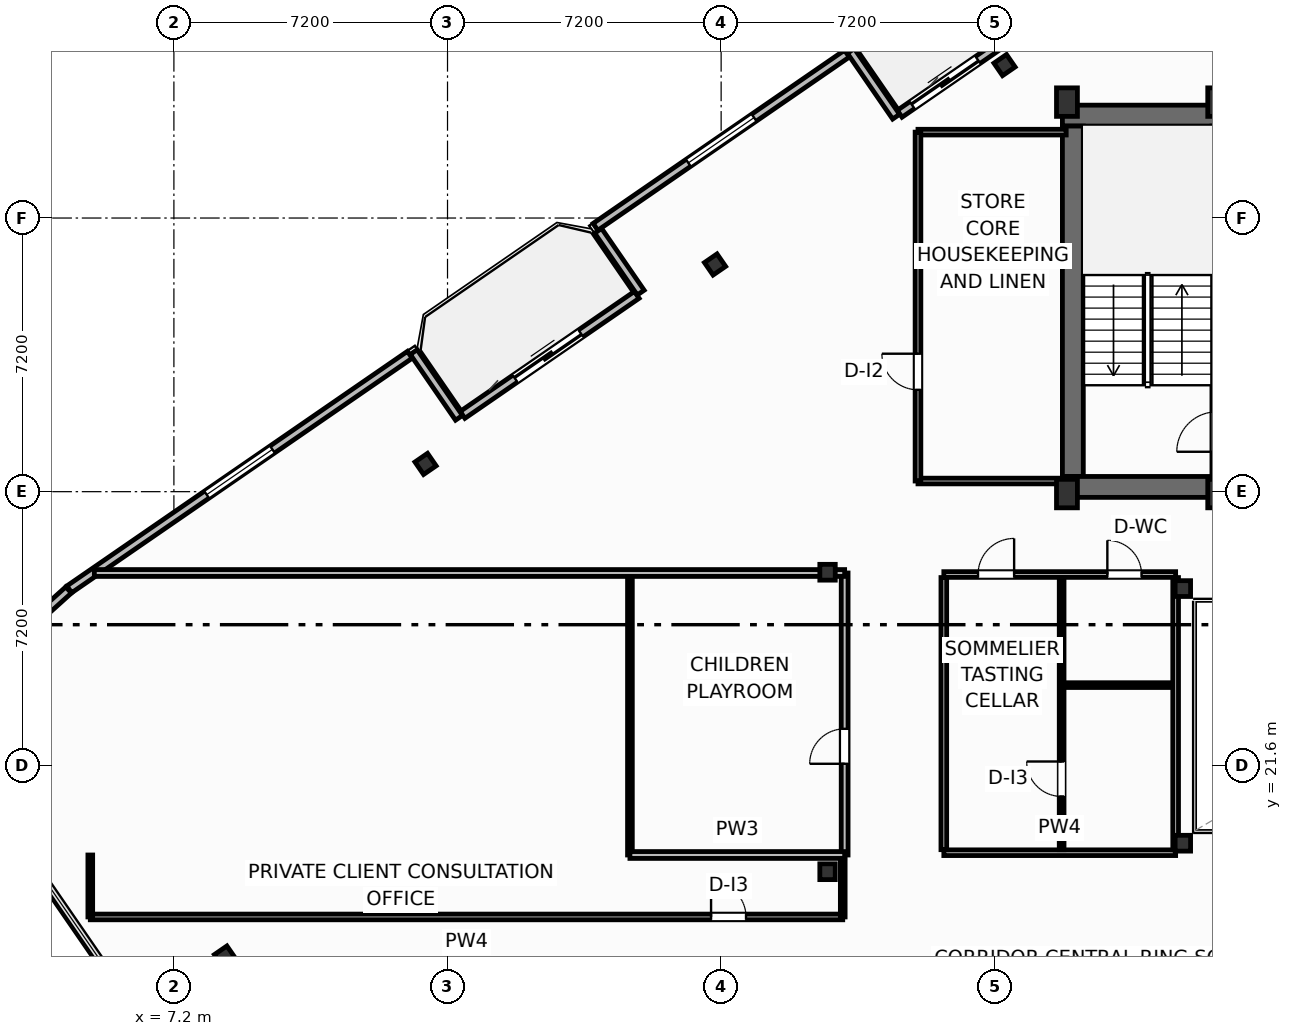
"""IFC4 building model, lengths in metres.
Left out: names, types, materials, properties, quantities, classifications, styles, units other than length and angle.
Written with IfcOpenShell. Run it as: python <this file> out.ifc"""

import sys

from ifc_helpers import new_model, si_unit, direction, frame, frame_2d, origin, origin_2d, place, context, subcontext, project, spatial, rectangle, i_section, extrude, element, fill, save


model = new_model("IFC4")
c1 = context("Model", 3, precision=1e-05, world=origin(), true_north=direction((0.0, 1.0)))
c2 = subcontext(c1, "Body", "Model", "MODEL_VIEW")
j1 = project(units=[si_unit("LENGTHUNIT", "METRE"), si_unit("PLANEANGLEUNIT", "RADIAN")], contexts=[c1])
p1 = place(None, origin())
s1 = spatial("IfcSite", under=j1, at=p1, CompositionType="ELEMENT")
p2 = place(p1, origin())
s2 = spatial("IfcBuilding", under=s1, at=p2, CompositionType="ELEMENT")
p3 = place(p2, frame((0.0, 0.0, 265.6)))
s3 = spatial("IfcBuildingStorey", under=s2, at=p3, CompositionType="ELEMENT", Elevation=265.6)
for number, where, z_axis, x_axis in (
    (1, (30.7, 28.75, 0.0), (0.0, 0.0, 1.0), (1.0, 0.0, 0.0)),
    (2, (34.68, 28.75, 0.0), (0.0, 0.0, 1.0), (1.0, 0.0, 0.0)),
    (3, (30.7, 39.05, 0.0), (0.0, 0.0, 1.0), (1.0, 0.0, 0.0)),
    (4, (34.68, 39.05, 0.0), (0.0, 0.0, 1.0), (1.0, 0.0, 0.0)),
):
    element("IfcColumn", number, at=place(p3, frame(where, z_axis=z_axis, x_axis=x_axis)), inside=s3, PredefinedType="COLUMN", context=c2, shape_type="SweptSolid", body=[
        extrude(rectangle(XDim=0.55, YDim=0.75, at=origin_2d()), origin(), (0.0, 0.0, 1.0), 3.7),
    ])
for number, where, z_axis, x_axis in (
    (5, (33.75, 19.55, 0.0), (0.0, 0.0, 1.0), (1.0, 0.0, 0.0)),
    (6, (33.75, 26.25, 0.0), (0.0, 0.0, 1.0), (1.0, 0.0, 0.0)),
    (7, (24.4, 18.8, 0.0), (0.0, 0.0, 1.0), (1.0, 0.0, 0.0)),
    (8, (24.4, 26.68, 0.0), (0.0, 0.0, 1.0), (1.0, 0.0, 0.0)),
):
    element("IfcColumn", number, at=place(p3, frame(where, z_axis=z_axis, x_axis=x_axis)), inside=s3, PredefinedType="COLUMN", context=c2, shape_type="SweptSolid", body=[
        extrude(i_section(OverallWidth=0.406, OverallDepth=0.416, WebThickness=0.03, FlangeThickness=0.048, FilletRadius=0.025, at=origin_2d()), origin(), (0.0, 0.0, 1.0), 3.7),
    ])
p4 = place(p3, frame((30.58, 38.695, 0.0), z_axis=(0.0, 0.0, 1.0), x_axis=(1.0, 0.0, 0.0)))
e9 = element("IfcWall", 9, at=p4, inside=s3, PredefinedType="SHEAR", context=c2, shape_type="SweptSolid", body=[
    extrude(rectangle(XDim=17.24, YDim=0.55, at=frame_2d((8.62, 0.0))), origin(), (0.0, 0.0, 1.0), 3.45),
])
p5 = place(p3, frame((30.855, 29.2, 0.0), z_axis=(0.0, 0.0, 1.0), x_axis=(0.0, 1.0, 0.0)))
e10 = element("IfcWall", 10, at=p5, inside=s3, PredefinedType="SHEAR", context=c2, shape_type="SweptSolid", body=[
    extrude(rectangle(XDim=9.22, YDim=0.55, at=frame_2d((4.61, 0.0))), origin(), (0.0, 0.0, 1.0), 3.45),
])
p6 = place(p3, frame((30.58, 28.925, 0.0), z_axis=(0.0, 0.0, 1.0), x_axis=(1.0, 0.0, 0.0)))
e11 = element("IfcWall", 11, at=p6, inside=s3, PredefinedType="SHEAR", context=c2, shape_type="SweptSolid", body=[
    extrude(rectangle(XDim=4.22, YDim=0.55, at=frame_2d((2.11, 0.0))), origin(), (0.0, 0.0, 1.0), 3.45),
])
p7 = place(p3, frame((34.64, 29.2, 0.0), z_axis=(0.0, 0.0, 1.0), x_axis=(0.0, 1.0, 0.0)))
e12 = element("IfcWall", 12, at=p7, inside=s3, PredefinedType="SHEAR", context=c2, shape_type="SweptSolid", body=[
    extrude(rectangle(XDim=9.22, YDim=0.25, at=frame_2d((4.61, 0.0))), origin(), (0.0, 0.0, 1.0), 3.45),
])
p8 = place(p7, frame((0.65, 0.0, 0.0)))
e13 = element("IfcOpeningElement", 13, at=p8, cuts=e12, PredefinedType="OPENING", context=c2, shape_type="SweptSolid", body=[
    extrude(rectangle(XDim=1.05, YDim=2.15, at=frame_2d((0.525, 1.075))), frame((0.0, 0.135, 0.0), z_axis=(0.0, -1.0, 0.0), x_axis=(1.0, 0.0, 0.0)), (0.0, 0.0, 1.0), 0.27),
])
for number, where, z_axis, x_axis in (
    (14, (29.057, 40.025, 0.0), (0.0, 0.0, 1.0), (0.824, 0.567, 0.0)),
    (15, (21.44, 34.778, 0.0), (0.0, 0.0, 1.0), (0.824, 0.567, 0.0)),
    (16, (13.822, 29.53, 0.0), (0.0, 0.0, 1.0), (0.824, 0.567, 0.0)),
    (17, (8.543, 16.569, 0.0), (0.0, 0.0, 1.0), (0.824, 0.567, 0.0)),
):
    element("IfcColumn", number, at=place(p3, frame(where, z_axis=z_axis, x_axis=x_axis)), inside=s3, PredefinedType="COLUMN", context=c2, shape_type="SweptSolid", body=[
        extrude(i_section(OverallWidth=0.401, OverallDepth=0.399, WebThickness=0.025, FlangeThickness=0.04, FilletRadius=0.022, at=origin_2d()), origin(), (0.0, 0.0, 1.0), 3.7),
    ])
p9 = place(p3, frame((14.795, 30.82, 0.0), z_axis=(0.0, 0.0, 1.0), x_axis=(0.823541290762, 0.567256328665, 0.0)))
e18 = element("IfcWall", 18, at=p9, inside=s3, PredefinedType="SOLIDWALL", context=c2, shape_type="SweptSolid", body=[
    extrude(rectangle(XDim=5.567, YDim=0.22, at=frame_2d((2.784, 0.0))), origin(), (0.0, 0.0, 1.0), 2.73),
])
p10 = place(p9, frame((1.68, 0.0, 0.0)))
e19 = element("IfcOpeningElement", 19, at=p10, cuts=e18, PredefinedType="OPENING", context=c2, shape_type="SweptSolid", body=[
    extrude(rectangle(XDim=2.1, YDim=2.3, at=frame_2d((1.05, 1.15))), frame((0.0, 0.12, 0.0), z_axis=(0.0, -1.0, 0.0), x_axis=(1.0, 0.0, 0.0)), (0.0, 0.0, 1.0), 0.24),
])
p11 = place(p3, frame((26.297, 38.743, 0.0), z_axis=(0.0, 0.0, 1.0), x_axis=(0.823534636215, 0.567265989598, 0.0)))
e20 = element("IfcWall", 20, at=p11, inside=s3, PredefinedType="SOLIDWALL", context=c2, shape_type="SweptSolid", body=[
    extrude(rectangle(XDim=6.0, YDim=0.22, at=frame_2d((3.0, 0.0))), origin(), (0.0, 0.0, 1.0), 2.73),
])
p12 = place(p11, frame((0.4, 0.0, 0.0)))
e21 = element("IfcOpeningElement", 21, at=p12, cuts=e20, PredefinedType="OPENING", context=c2, shape_type="SweptSolid", body=[
    extrude(rectangle(XDim=2.1, YDim=2.3, at=frame_2d((1.05, 1.15))), frame((0.0, 0.12, 0.0), z_axis=(0.0, -1.0, 0.0), x_axis=(1.0, 0.0, 0.0)), (0.0, 0.0, 1.0), 0.24),
])
p13 = place(p3, frame((26.204, 38.667, 0.0), z_axis=(0.0, 0.0, 1.0), x_axis=(-0.567219383419, 0.823566737474, 0.0)))
e22 = element("IfcWall", 22, at=p13, inside=s3, PredefinedType="SOLIDWALL", context=c2, shape_type="SweptSolid", body=[
    extrude(rectangle(XDim=2.1, YDim=0.22, at=frame_2d((1.05, 0.0))), origin(), (0.0, 0.0, 1.0), 2.73),
])
p14 = place(p3, frame((24.91, 40.325, 0.0), z_axis=(0.0, 0.0, 1.0), x_axis=(-0.823521165086, -0.56728554596, 0.0)))
e23 = element("IfcWall", 23, at=p14, inside=s3, PredefinedType="SOLIDWALL", context=c2, shape_type="SweptSolid", body=[
    extrude(rectangle(XDim=8.035, YDim=0.22, at=frame_2d((4.018, 0.0))), origin(), (0.0, 0.0, 1.0), 2.73),
])
p15 = place(p14, frame((2.968, 0.0, 0.8)))
e24 = element("IfcOpeningElement", 24, at=p15, cuts=e23, PredefinedType="OPENING", context=c2, shape_type="SweptSolid", body=[
    extrude(rectangle(XDim=2.1, YDim=1.75, at=frame_2d((1.05, 0.875))), frame((0.0, 0.12, 0.0), z_axis=(0.0, -1.0, 0.0), x_axis=(1.0, 0.0, 0.0)), (0.0, 0.0, 1.0), 0.24),
])
p16 = place(p3, frame((18.364, 35.664, 0.0), z_axis=(0.0, 0.0, 1.0), x_axis=(0.567215821234, -0.823569190865, 0.0)))
e25 = element("IfcWall", 25, at=p16, inside=s3, PredefinedType="SOLIDWALL", context=c2, shape_type="SweptSolid", body=[
    extrude(rectangle(XDim=1.975, YDim=0.22, at=frame_2d((0.988, 0.0))), origin(), (0.0, 0.0, 1.0), 2.73),
])
p17 = place(p3, frame((14.702, 30.744, 0.0), z_axis=(0.0, 0.0, 1.0), x_axis=(-0.567352541689, 0.823475010816, 0.0)))
e26 = element("IfcWall", 26, at=p17, inside=s3, PredefinedType="SOLIDWALL", context=c2, shape_type="SweptSolid", body=[
    extrude(rectangle(XDim=2.1, YDim=0.22, at=frame_2d((1.05, 0.0))), origin(), (0.0, 0.0, 1.0), 2.73),
])
p18 = place(p3, frame((13.408, 32.402, 0.0), z_axis=(0.0, 0.0, 1.0), x_axis=(-0.823527634633, -0.567276154087, 0.0)))
e27 = element("IfcWall", 27, at=p18, inside=s3, PredefinedType="SOLIDWALL", context=c2, shape_type="SweptSolid", body=[
    extrude(rectangle(XDim=10.88, YDim=0.22, at=frame_2d((5.44, 0.0))), origin(), (0.0, 0.0, 1.0), 2.73),
])
p19 = place(p18, frame((4.39, 0.0, 0.8)))
e28 = element("IfcOpeningElement", 28, at=p19, cuts=e27, PredefinedType="OPENING", context=c2, shape_type="SweptSolid", body=[
    extrude(rectangle(XDim=2.1, YDim=1.75, at=frame_2d((1.05, 0.875))), frame((0.0, 0.12, 0.0), z_axis=(0.0, -1.0, 0.0), x_axis=(1.0, 0.0, 0.0)), (0.0, 0.0, 1.0), 0.24),
])
p20 = place(p3, frame((4.429, 26.213, 0.0), z_axis=(0.0, 0.0, 1.0), x_axis=(-0.742414330744, -0.669941013453, 0.0)))
e29 = element("IfcWall", 29, at=p20, inside=s3, PredefinedType="SOLIDWALL", context=c2, shape_type="SweptSolid", body=[
    extrude(rectangle(XDim=1.257, YDim=0.22, at=frame_2d((0.628, 0.0))), origin(), (0.0, 0.0, 1.0), 2.73),
])
p21 = place(p3, frame((5.0, 17.61, 0.0), z_axis=(0.0, 0.0, 1.0), x_axis=(1.0, 0.0, 0.0)))
e30 = element("IfcWall", 30, at=p21, inside=s3, PredefinedType="PARTITIONING", context=c2, shape_type="SweptSolid", body=[
    extrude(rectangle(XDim=19.8, YDim=0.15, at=frame_2d((9.9, 0.0))), origin(), (0.0, 0.0, 1.0), 2.739),
])
p22 = place(p21, frame((16.335, 0.0, 0.0)))
e31 = element("IfcOpeningElement", 31, at=p22, cuts=e30, PredefinedType="OPENING", context=c2, shape_type="SweptSolid", body=[
    extrude(rectangle(XDim=0.92, YDim=2.05, at=frame_2d((0.46, 1.025))), frame((0.0, 0.085, 0.0), z_axis=(0.0, -1.0, 0.0), x_axis=(1.0, 0.0, 0.0)), (0.0, 0.0, 1.0), 0.17),
])
for number, where, z_axis, x_axis in (
    (32, (5.0, 17.61, 0.0), (0.0, 0.0, 1.0), (0.0, 1.0, 0.0)),
    (33, (24.8, 17.61, 0.0), (0.0, 0.0, 1.0), (0.0, 1.0, 0.0)),
):
    element("IfcWall", number, at=place(p3, frame(where, z_axis=z_axis, x_axis=x_axis)), inside=s3, PredefinedType="PARTITIONING", context=c2, shape_type="SweptSolid", body=[
        extrude(rectangle(XDim=1.63, YDim=0.125, at=frame_2d((0.815, 0.0))), origin(), (0.0, 0.0, 1.0), 3.45),
    ])
p23 = place(p3, frame((24.85, 19.24, 0.0), z_axis=(0.0, 0.0, 1.0), x_axis=(0.0, 1.0, 0.0)))
e34 = element("IfcWall", 34, at=p23, inside=s3, PredefinedType="PARTITIONING", context=c2, shape_type="SweptSolid", body=[
    extrude(rectangle(XDim=7.42, YDim=0.18, at=frame_2d((3.71, 0.0))), origin(), (0.0, 0.0, 1.0), 3.45),
])
p24 = place(p23, frame((2.4, 0.0, 0.0)))
e35 = element("IfcOpeningElement", 35, at=p24, cuts=e34, PredefinedType="OPENING", context=c2, shape_type="SweptSolid", body=[
    extrude(rectangle(XDim=0.92, YDim=2.05, at=frame_2d((0.46, 1.025))), frame((0.0, 0.1, 0.0), z_axis=(0.0, -1.0, 0.0), x_axis=(1.0, 0.0, 0.0)), (0.0, 0.0, 1.0), 0.2),
])
p25 = place(p3, frame((19.2, 19.24, 0.0), z_axis=(0.0, 0.0, 1.0), x_axis=(0.0, 1.0, 0.0)))
e36 = element("IfcWall", 36, at=p25, inside=s3, PredefinedType="PARTITIONING", context=c2, shape_type="SweptSolid", body=[
    extrude(rectangle(XDim=7.42, YDim=0.125, at=frame_2d((3.71, 0.0))), origin(), (0.0, 0.0, 1.0), 3.45),
])
p26 = place(p3, frame((19.2, 19.24, 0.0), z_axis=(0.0, 0.0, 1.0), x_axis=(1.0, 0.0, 0.0)))
e37 = element("IfcWall", 37, at=p26, inside=s3, PredefinedType="PARTITIONING", context=c2, shape_type="SweptSolid", body=[
    extrude(rectangle(XDim=5.65, YDim=0.18, at=frame_2d((2.825, 0.0))), origin(), (0.0, 0.0, 1.0), 3.45),
])
p27 = place(p3, frame((5.107, 26.66, 0.0), z_axis=(0.0, 0.0, 1.0), x_axis=(1.0, 0.0, 0.0)))
e38 = element("IfcWall", 38, at=p27, inside=s3, PredefinedType="PARTITIONING", context=c2, shape_type="SweptSolid", body=[
    extrude(rectangle(XDim=19.743, YDim=0.18, at=frame_2d((9.872, 0.0))), origin(), (0.0, 0.0, 1.0), 2.662),
])
p28 = place(p3, frame((27.46, 26.62, 0.0), z_axis=(0.0, 0.0, 1.0), x_axis=(1.0, 0.0, 0.0)))
e39 = element("IfcWall", 39, at=p28, inside=s3, PredefinedType="PARTITIONING", context=c2, shape_type="SweptSolid", body=[
    extrude(rectangle(XDim=6.1, YDim=0.15, at=frame_2d((3.05, 0.0))), origin(), (0.0, 0.0, 1.0), 2.662),
])
p29 = place(p28, frame((0.9, 0.0, 0.0)))
e40 = element("IfcOpeningElement", 40, at=p29, cuts=e39, PredefinedType="OPENING", context=c2, shape_type="SweptSolid", body=[
    extrude(rectangle(XDim=0.95, YDim=2.05, at=frame_2d((0.475, 1.025))), frame((0.0, 0.085, 0.0), z_axis=(0.0, -1.0, 0.0), x_axis=(1.0, 0.0, 0.0)), (0.0, 0.0, 1.0), 0.17),
])
p30 = place(p28, frame((4.303, 0.0, 0.0)))
e41 = element("IfcOpeningElement", 41, at=p30, cuts=e39, PredefinedType="OPENING", context=c2, shape_type="SweptSolid", body=[
    extrude(rectangle(XDim=0.9, YDim=2.05, at=frame_2d((0.45, 1.025))), frame((0.0, 0.085, 0.0), z_axis=(0.0, -1.0, 0.0), x_axis=(1.0, 0.0, 0.0)), (0.0, 0.0, 1.0), 0.17),
])
p31 = place(p3, frame((27.46, 19.3, 0.0), z_axis=(0.0, 0.0, 1.0), x_axis=(1.0, 0.0, 0.0)))
e42 = element("IfcWall", 42, at=p31, inside=s3, PredefinedType="PARTITIONING", context=c2, shape_type="SweptSolid", body=[
    extrude(rectangle(XDim=6.1, YDim=0.15, at=frame_2d((3.05, 0.0))), origin(), (0.0, 0.0, 1.0), 2.662),
])
p32 = place(p3, frame((30.56, 19.38, 0.0), z_axis=(0.0, 0.0, 1.0), x_axis=(0.0, 1.0, 0.0)))
e43 = element("IfcWall", 43, at=p32, inside=s3, PredefinedType="PARTITIONING", context=c2, shape_type="SweptSolid", body=[
    extrude(rectangle(XDim=7.16, YDim=0.125, at=frame_2d((3.58, 0.0))), origin(), (0.0, 0.0, 1.0), 3.45),
])
p33 = place(p32, frame((1.4, 0.0, 0.0)))
e44 = element("IfcOpeningElement", 44, at=p33, cuts=e43, PredefinedType="OPENING", context=c2, shape_type="SweptSolid", body=[
    extrude(rectangle(XDim=0.92, YDim=2.05, at=frame_2d((0.46, 1.025))), frame((0.0, 0.073, 0.0), z_axis=(0.0, -1.0, 0.0), x_axis=(1.0, 0.0, 0.0)), (0.0, 0.0, 1.0), 0.145),
])
p34 = place(p3, frame((30.64, 23.71, 0.0), z_axis=(0.0, 0.0, 1.0), x_axis=(1.0, 0.0, 0.0)))
e45 = element("IfcWall", 45, at=p34, inside=s3, PredefinedType="PARTITIONING", context=c2, shape_type="SweptSolid", body=[
    extrude(rectangle(XDim=2.88, YDim=0.125, at=frame_2d((1.44, 0.0))), origin(), (0.0, 0.0, 1.0), 3.45),
])
p35 = place(p3, frame((27.46, 19.38, 0.0), z_axis=(0.0, 0.0, 1.0), x_axis=(0.0, 1.0, 0.0)))
e46 = element("IfcWall", 46, at=p35, inside=s3, PredefinedType="PARTITIONING", context=c2, shape_type="SweptSolid", body=[
    extrude(rectangle(XDim=7.16, YDim=0.15, at=frame_2d((3.58, 0.0))), origin(), (0.0, 0.0, 1.0), 3.45),
])
p36 = place(p3, frame((33.56, 19.38, 0.0), z_axis=(0.0, 0.0, 1.0), x_axis=(0.0, 1.0, 0.0)))
e47 = element("IfcWall", 47, at=p36, inside=s3, PredefinedType="PARTITIONING", context=c2, shape_type="SweptSolid", body=[
    extrude(rectangle(XDim=7.16, YDim=0.15, at=frame_2d((3.58, 0.0))), origin(), (0.0, 0.0, 1.0), 2.824),
])
p37 = place(p3, frame((26.78, 29.08, 0.0), z_axis=(0.0, 0.0, 1.0), x_axis=(1.0, 0.0, 0.0)))
e48 = element("IfcWall", 48, at=p37, inside=s3, PredefinedType="PARTITIONING", context=c2, shape_type="SweptSolid", body=[
    extrude(rectangle(XDim=3.8, YDim=0.15, at=frame_2d((1.9, 0.0))), origin(), (0.0, 0.0, 1.0), 3.45),
])
p38 = place(p3, frame((26.78, 38.26, 0.0), z_axis=(0.0, 0.0, 1.0), x_axis=(1.0, 0.0, 0.0)))
e49 = element("IfcWall", 49, at=p38, inside=s3, PredefinedType="PARTITIONING", context=c2, shape_type="SweptSolid", body=[
    extrude(rectangle(XDim=3.9, YDim=0.15, at=frame_2d((1.95, 0.0))), origin(), (0.0, 0.0, 1.0), 3.45),
])
p39 = place(p3, frame((26.78, 29.08, 0.0), z_axis=(0.0, 0.0, 1.0), x_axis=(0.0, 1.0, 0.0)))
e50 = element("IfcWall", 50, at=p39, inside=s3, PredefinedType="PARTITIONING", context=c2, shape_type="SweptSolid", body=[
    extrude(rectangle(XDim=9.18, YDim=0.15, at=frame_2d((4.59, 0.0))), origin(), (0.0, 0.0, 1.0), 3.45),
])
p40 = place(p39, frame((2.4, 0.0, 0.0)))
e51 = element("IfcOpeningElement", 51, at=p40, cuts=e50, PredefinedType="OPENING", context=c2, shape_type="SweptSolid", body=[
    extrude(rectangle(XDim=0.95, YDim=2.05, at=frame_2d((0.475, 1.025))), frame((0.0, 0.085, 0.0), z_axis=(0.0, -1.0, 0.0), x_axis=(1.0, 0.0, 0.0)), (0.0, 0.0, 1.0), 0.17),
])
p41 = place(p10, origin())
e52 = element("IfcDoor", 52, at=p41, inside=s3, OperationType="SLIDING_TO_LEFT", PredefinedType="DOOR", context=c2, shape_type="SweptSolid", body=[
    extrude(rectangle(XDim=2.1, YDim=2.3, at=frame_2d((1.05, 1.15))), frame((0.0, 0.025, 0.0), z_axis=(0.0, -1.0, 0.0), x_axis=(1.0, 0.0, 0.0)), (0.0, 0.0, 1.0), 0.05),
])
fill(e19, e52)
p42 = place(p12, origin())
e53 = element("IfcDoor", 53, at=p42, inside=s3, OperationType="SLIDING_TO_LEFT", PredefinedType="DOOR", context=c2, shape_type="SweptSolid", body=[
    extrude(rectangle(XDim=2.1, YDim=2.3, at=frame_2d((1.05, 1.15))), frame((0.0, 0.025, 0.0), z_axis=(0.0, -1.0, 0.0), x_axis=(1.0, 0.0, 0.0)), (0.0, 0.0, 1.0), 0.05),
])
fill(e21, e53)
p43 = place(p15, origin())
e54 = element("IfcWindow", 54, at=p43, inside=s3, PartitioningType="SINGLE_PANEL", PredefinedType="WINDOW", context=c2, shape_type="SweptSolid", body=[
    extrude(rectangle(XDim=2.1, YDim=1.75, at=frame_2d((1.05, 0.875))), frame((0.0, 0.03, 0.0), z_axis=(0.0, -1.0, 0.0), x_axis=(1.0, 0.0, 0.0)), (0.0, 0.0, 1.0), 0.06),
])
fill(e24, e54)
p44 = place(p19, origin())
e55 = element("IfcWindow", 55, at=p44, inside=s3, PartitioningType="SINGLE_PANEL", PredefinedType="WINDOW", context=c2, shape_type="SweptSolid", body=[
    extrude(rectangle(XDim=2.1, YDim=1.75, at=frame_2d((1.05, 0.875))), frame((0.0, 0.03, 0.0), z_axis=(0.0, -1.0, 0.0), x_axis=(1.0, 0.0, 0.0)), (0.0, 0.0, 1.0), 0.06),
])
fill(e28, e55)
p45 = place(p22, origin())
e56 = element("IfcDoor", 56, at=p45, inside=s3, OperationType="SINGLE_SWING_LEFT", PredefinedType="DOOR", context=c2, shape_type="SweptSolid", body=[
    extrude(rectangle(XDim=0.92, YDim=2.05, at=frame_2d((0.46, 1.025))), frame((0.0, 0.025, 0.0), z_axis=(0.0, -1.0, 0.0), x_axis=(1.0, 0.0, 0.0)), (0.0, 0.0, 1.0), 0.05),
])
fill(e31, e56)
p46 = place(p24, origin())
e57 = element("IfcDoor", 57, at=p46, inside=s3, OperationType="SINGLE_SWING_LEFT", PredefinedType="DOOR", context=c2, shape_type="SweptSolid", body=[
    extrude(rectangle(XDim=0.92, YDim=2.05, at=frame_2d((0.46, 1.025))), frame((0.0, 0.025, 0.0), z_axis=(0.0, -1.0, 0.0), x_axis=(1.0, 0.0, 0.0)), (0.0, 0.0, 1.0), 0.05),
])
fill(e35, e57)
p47 = place(p29, origin())
e58 = element("IfcDoor", 58, at=p47, inside=s3, OperationType="SINGLE_SWING_RIGHT", PredefinedType="DOOR", context=c2, shape_type="SweptSolid", body=[
    extrude(rectangle(XDim=0.95, YDim=2.05, at=frame_2d((0.475, 1.025))), frame((0.0, 0.025, 0.0), z_axis=(0.0, -1.0, 0.0), x_axis=(1.0, 0.0, 0.0)), (0.0, 0.0, 1.0), 0.05),
])
fill(e40, e58)
p48 = place(p30, origin())
e59 = element("IfcDoor", 59, at=p48, inside=s3, OperationType="SINGLE_SWING_LEFT", PredefinedType="DOOR", context=c2, shape_type="SweptSolid", body=[
    extrude(rectangle(XDim=0.9, YDim=2.05, at=frame_2d((0.45, 1.025))), frame((0.0, 0.025, 0.0), z_axis=(0.0, -1.0, 0.0), x_axis=(1.0, 0.0, 0.0)), (0.0, 0.0, 1.0), 0.05),
])
fill(e41, e59)
p49 = place(p33, origin())
e60 = element("IfcDoor", 60, at=p49, inside=s3, OperationType="SINGLE_SWING_RIGHT", PredefinedType="DOOR", context=c2, shape_type="SweptSolid", body=[
    extrude(rectangle(XDim=0.92, YDim=2.05, at=frame_2d((0.46, 1.025))), frame((0.0, 0.025, 0.0), z_axis=(0.0, -1.0, 0.0), x_axis=(1.0, 0.0, 0.0)), (0.0, 0.0, 1.0), 0.05),
])
fill(e44, e60)
p50 = place(p40, origin())
e61 = element("IfcDoor", 61, at=p50, inside=s3, OperationType="SINGLE_SWING_RIGHT", PredefinedType="DOOR", context=c2, shape_type="SweptSolid", body=[
    extrude(rectangle(XDim=0.95, YDim=2.05, at=frame_2d((0.475, 1.025))), frame((0.0, 0.025, 0.0), z_axis=(0.0, -1.0, 0.0), x_axis=(1.0, 0.0, 0.0)), (0.0, 0.0, 1.0), 0.05),
])
fill(e51, e61)
save(model, sys.argv[1])
